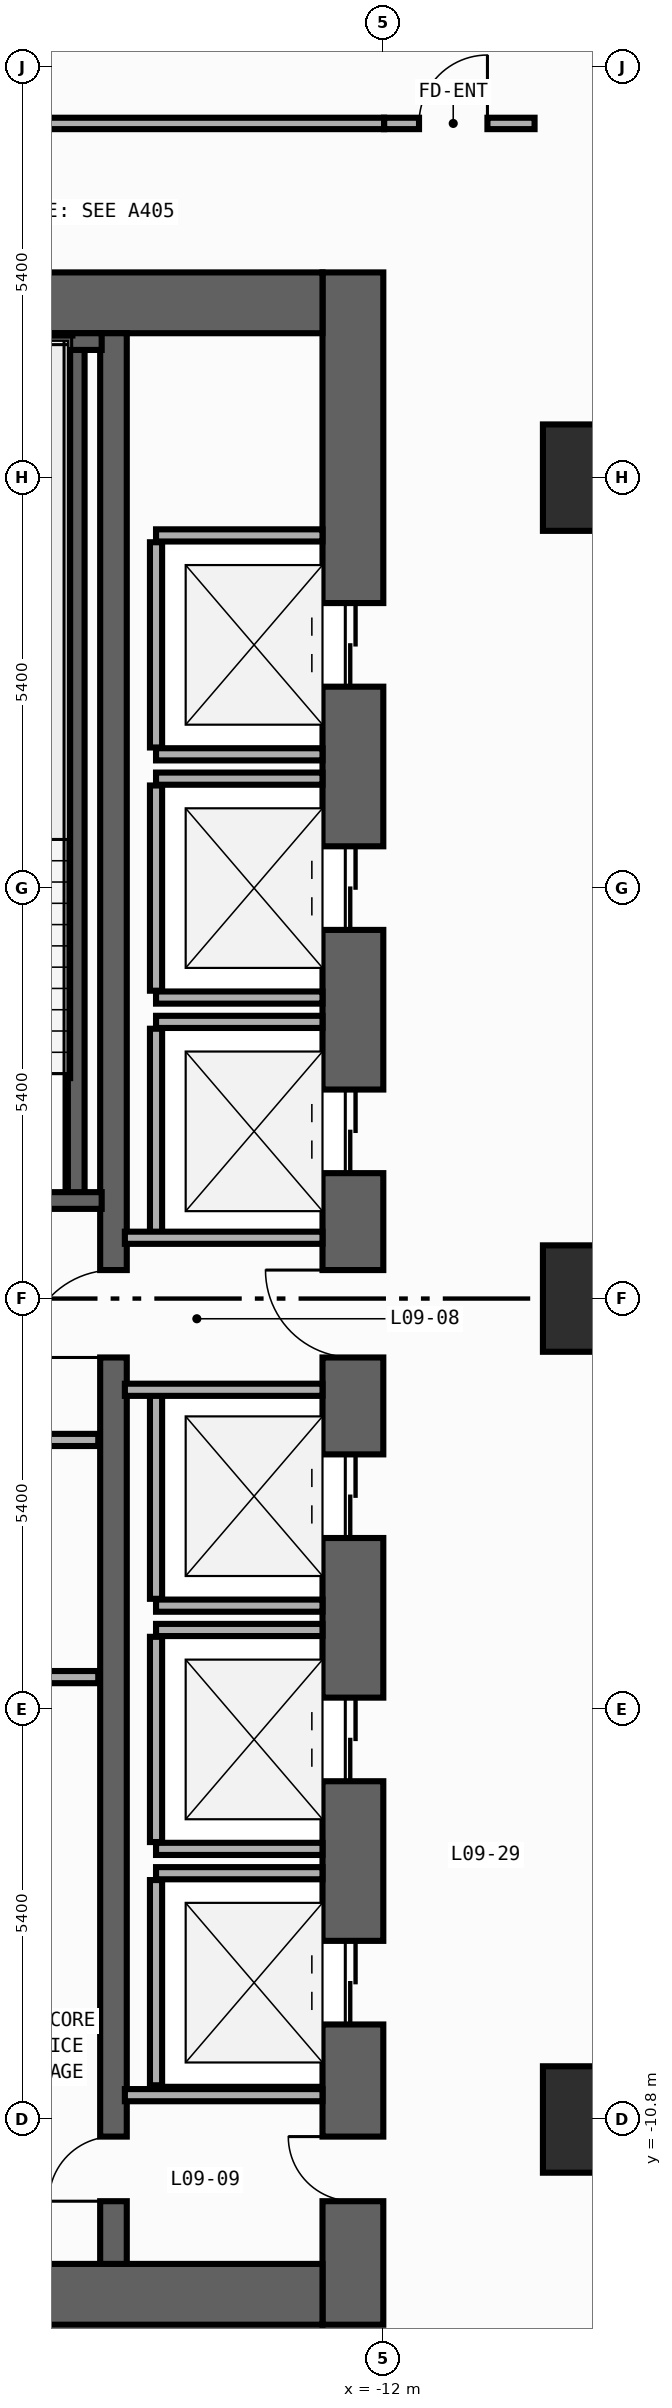
"""IFC4 building model, lengths in metres.
Left out: names, types, materials, properties, quantities, classifications, styles, units other than length and angle.
Written with IfcOpenShell. Run it as: python <this file> out.ifc"""

import sys

from ifc_helpers import new_model, si_unit, direction, frame, frame_2d, origin, origin_2d, place, context, subcontext, project, spatial, rectangle, extrude, element, fill, save


model = new_model("IFC4")
c1 = context("Model", 3, precision=1e-05, world=origin(), true_north=direction((0.0, 1.0)))
c2 = subcontext(c1, "Body", "Model", "MODEL_VIEW")
j1 = project(units=[si_unit("LENGTHUNIT", "METRE"), si_unit("PLANEANGLEUNIT", "RADIAN")], contexts=[c1])
p1 = place(None, origin())
s1 = spatial("IfcSite", under=j1, at=p1, CompositionType="ELEMENT")
p2 = place(p1, origin())
s2 = spatial("IfcBuilding", under=s1, at=p2, CompositionType="ELEMENT")
p3 = place(p2, frame((0.0, 0.0, 38.6)))
s3 = spatial("IfcBuildingStorey", under=s2, at=p3, CompositionType="ELEMENT", Elevation=38.6)
p4 = place(p3, frame((-12.4, -13.5, 0.0), z_axis=(0.0, 0.0, 1.0), x_axis=(0.0, 1.0, 0.0)))
e1 = element("IfcWall", 1, at=p4, inside=s3, PredefinedType="SHEAR", context=c2, shape_type="SweptSolid", body=[
    extrude(rectangle(XDim=27.0, YDim=0.8, at=frame_2d((13.5, 0.0))), origin(), (0.0, 0.0, 1.0), 3.94),
])
p5 = place(p4, frame((21.55, 0.0, 0.0)))
e2 = element("IfcOpeningElement", 2, at=p5, cuts=e1, PredefinedType="OPENING", context=c2, shape_type="SweptSolid", body=[
    extrude(rectangle(XDim=1.1, YDim=2.2, at=frame_2d((0.55, 1.1))), frame((0.0, 0.41, 0.0), z_axis=(0.0, -1.0, 0.0), x_axis=(1.0, 0.0, 0.0)), (0.0, 0.0, 1.0), 0.82),
])
p6 = place(p4, frame((18.35, 0.0, 0.0)))
e3 = element("IfcOpeningElement", 3, at=p6, cuts=e1, PredefinedType="OPENING", context=c2, shape_type="SweptSolid", body=[
    extrude(rectangle(XDim=1.1, YDim=2.2, at=frame_2d((0.55, 1.1))), frame((0.0, 0.41, 0.0), z_axis=(0.0, -1.0, 0.0), x_axis=(1.0, 0.0, 0.0)), (0.0, 0.0, 1.0), 0.82),
])
p7 = place(p4, frame((15.15, 0.0, 0.0)))
e4 = element("IfcOpeningElement", 4, at=p7, cuts=e1, PredefinedType="OPENING", context=c2, shape_type="SweptSolid", body=[
    extrude(rectangle(XDim=1.1, YDim=2.2, at=frame_2d((0.55, 1.1))), frame((0.0, 0.41, 0.0), z_axis=(0.0, -1.0, 0.0), x_axis=(1.0, 0.0, 0.0)), (0.0, 0.0, 1.0), 0.82),
])
p8 = place(p4, frame((10.35, 0.0, 0.0)))
e5 = element("IfcOpeningElement", 5, at=p8, cuts=e1, PredefinedType="OPENING", context=c2, shape_type="SweptSolid", body=[
    extrude(rectangle(XDim=1.1, YDim=2.2, at=frame_2d((0.55, 1.1))), frame((0.0, 0.41, 0.0), z_axis=(0.0, -1.0, 0.0), x_axis=(1.0, 0.0, 0.0)), (0.0, 0.0, 1.0), 0.82),
])
p9 = place(p4, frame((7.15, 0.0, 0.0)))
e6 = element("IfcOpeningElement", 6, at=p9, cuts=e1, PredefinedType="OPENING", context=c2, shape_type="SweptSolid", body=[
    extrude(rectangle(XDim=1.1, YDim=2.2, at=frame_2d((0.55, 1.1))), frame((0.0, 0.41, 0.0), z_axis=(0.0, -1.0, 0.0), x_axis=(1.0, 0.0, 0.0)), (0.0, 0.0, 1.0), 0.82),
])
p10 = place(p4, frame((3.95, 0.0, 0.0)))
e7 = element("IfcOpeningElement", 7, at=p10, cuts=e1, PredefinedType="OPENING", context=c2, shape_type="SweptSolid", body=[
    extrude(rectangle(XDim=1.1, YDim=2.2, at=frame_2d((0.55, 1.1))), frame((0.0, 0.41, 0.0), z_axis=(0.0, -1.0, 0.0), x_axis=(1.0, 0.0, 0.0)), (0.0, 0.0, 1.0), 0.82),
])
p11 = place(p4, frame((12.725, 0.0, 0.0)))
e8 = element("IfcOpeningElement", 8, at=p11, cuts=e1, PredefinedType="OPENING", context=c2, shape_type="SweptSolid", body=[
    extrude(rectangle(XDim=1.15, YDim=2.2, at=frame_2d((0.575, 1.1))), frame((0.0, 0.41, 0.0), z_axis=(0.0, -1.0, 0.0), x_axis=(1.0, 0.0, 0.0)), (0.0, 0.0, 1.0), 0.82),
])
p12 = place(p4, frame((1.625, 0.0, 0.0)))
e9 = element("IfcOpeningElement", 9, at=p12, cuts=e1, PredefinedType="OPENING", context=c2, shape_type="SweptSolid", body=[
    extrude(rectangle(XDim=0.85, YDim=2.1, at=frame_2d((0.425, 1.05))), frame((0.0, 0.41, 0.0), z_axis=(0.0, -1.0, 0.0), x_axis=(1.0, 0.0, 0.0)), (0.0, 0.0, 1.0), 0.82),
])
for number, where, z_axis, x_axis in (
    (10, (-19.6, -13.1, 0.0), (0.0, 0.0, 1.0), (1.0, 0.0, 0.0)),
    (11, (-19.6, 13.1, 0.0), (0.0, 0.0, 1.0), (1.0, 0.0, 0.0)),
):
    element("IfcWall", number, at=place(p3, frame(where, z_axis=z_axis, x_axis=x_axis)), inside=s3, PredefinedType="SHEAR", context=c2, shape_type="SweptSolid", body=[
        extrude(rectangle(XDim=6.8, YDim=0.8, at=frame_2d((3.4, 0.0))), origin(), (0.0, 0.0, 1.0), 3.94),
    ])
p13 = place(p3, frame((-15.55, -12.7, 0.0), z_axis=(0.0, 0.0, 1.0), x_axis=(0.0, 1.0, 0.0)))
e12 = element("IfcWall", 12, at=p13, inside=s3, PredefinedType="SHEAR", context=c2, shape_type="SweptSolid", body=[
    extrude(rectangle(XDim=25.4, YDim=0.35, at=frame_2d((12.7, 0.0))), origin(), (0.0, 0.0, 1.0), 3.94),
])
p14 = place(p13, frame((11.925, 0.0, 0.0)))
e13 = element("IfcOpeningElement", 13, at=p14, cuts=e12, PredefinedType="OPENING", context=c2, shape_type="SweptSolid", body=[
    extrude(rectangle(XDim=1.15, YDim=2.2, at=frame_2d((0.575, 1.1))), frame((0.0, 0.185, 0.0), z_axis=(0.0, -1.0, 0.0), x_axis=(1.0, 0.0, 0.0)), (0.0, 0.0, 1.0), 0.37),
])
p15 = place(p13, frame((0.825, 0.0, 0.0)))
e14 = element("IfcOpeningElement", 14, at=p15, cuts=e12, PredefinedType="OPENING", context=c2, shape_type="SweptSolid", body=[
    extrude(rectangle(XDim=0.85, YDim=2.1, at=frame_2d((0.425, 1.05))), frame((0.0, 0.185, 0.0), z_axis=(0.0, -1.0, 0.0), x_axis=(1.0, 0.0, 0.0)), (0.0, 0.0, 1.0), 0.37),
])
p16 = place(p3, frame((-16.04, 1.29, 0.0), z_axis=(0.0, 0.0, 1.0), x_axis=(0.0, 1.0, 0.0)))
e15 = element("IfcWall", 15, at=p16, inside=s3, PredefinedType="SHEAR", context=c2, shape_type="SweptSolid", body=[
    extrude(rectangle(XDim=11.3, YDim=0.22, at=frame_2d((5.65, 0.0))), origin(), (0.0, 0.0, 1.0), 3.94),
])
p17 = place(p3, frame((-19.62, 12.59, 0.0), z_axis=(0.0, 0.0, 1.0), x_axis=(1.0, 0.0, 0.0)))
e16 = element("IfcWall", 16, at=p17, inside=s3, PredefinedType="SHEAR", context=c2, shape_type="SweptSolid", body=[
    extrude(rectangle(XDim=3.915, YDim=0.22, at=frame_2d((1.958, 0.0))), origin(), (0.0, 0.0, 1.0), 3.94),
])
p18 = place(p3, frame((-19.62, 1.29, 0.0), z_axis=(0.0, 0.0, 1.0), x_axis=(1.0, 0.0, 0.0)))
e17 = element("IfcWall", 17, at=p18, inside=s3, PredefinedType="SHEAR", context=c2, shape_type="SweptSolid", body=[
    extrude(rectangle(XDim=3.915, YDim=0.22, at=frame_2d((1.958, 0.0))), origin(), (0.0, 0.0, 1.0), 3.94),
])
p19 = place(p18, frame((1.08, 0.0, 0.0)))
e18 = element("IfcOpeningElement", 18, at=p19, cuts=e17, PredefinedType="OPENING", context=c2, shape_type="SweptSolid", body=[
    extrude(rectangle(XDim=1.1, YDim=2.2, at=frame_2d((0.55, 1.1))), frame((0.0, 0.12, 0.0), z_axis=(0.0, -1.0, 0.0), x_axis=(1.0, 0.0, 0.0)), (0.0, 0.0, 1.0), 0.24),
])
for number, where, z_axis, x_axis in (
    (19, (-9.2, -10.8, 0.0), (0.0, 0.0, 1.0), (1.0, 0.0, 0.0)),
    (20, (-9.2, 0.0, 0.0), (0.0, 0.0, 1.0), (1.0, 0.0, 0.0)),
    (21, (-9.2, 10.8, 0.0), (0.0, 0.0, 1.0), (1.0, 0.0, 0.0)),
):
    element("IfcColumn", number, at=place(p3, frame(where, z_axis=z_axis, x_axis=x_axis)), inside=s3, PredefinedType="COLUMN", context=c2, shape_type="SweptSolid", body=[
        extrude(rectangle(XDim=1.4, YDim=1.4, at=origin_2d()), origin(), (0.0, 0.0, 1.0), 4.2),
    ])
for number, where, z_axis, x_axis in (
    (22, (-14.99, 7.16, 0.0), (0.0, 0.0, 1.0), (1.0, 0.0, 0.0)),
    (23, (-14.99, 10.04, 0.0), (0.0, 0.0, 1.0), (1.0, 0.0, 0.0)),
):
    element("IfcWall", number, at=place(p3, frame(where, z_axis=z_axis, x_axis=x_axis)), inside=s3, PredefinedType="STANDARD", context=c2, shape_type="SweptSolid", body=[
        extrude(rectangle(XDim=2.19, YDim=0.16, at=frame_2d((1.095, 0.0))), origin(), (0.0, 0.0, 1.0), 3.94),
    ])
p20 = place(p3, frame((-14.99, 7.25, 0.0), z_axis=(0.0, 0.0, 1.0), x_axis=(0.0, 1.0, 0.0)))
e24 = element("IfcWall", 24, at=p20, inside=s3, PredefinedType="STANDARD", context=c2, shape_type="SweptSolid", body=[
    extrude(rectangle(XDim=2.7, YDim=0.16, at=frame_2d((1.35, 0.0))), origin(), (0.0, 0.0, 1.0), 3.94),
])
for number, where, z_axis, x_axis in (
    (25, (-14.99, 3.96, 0.0), (0.0, 0.0, 1.0), (1.0, 0.0, 0.0)),
    (26, (-14.99, 6.84, 0.0), (0.0, 0.0, 1.0), (1.0, 0.0, 0.0)),
):
    element("IfcWall", number, at=place(p3, frame(where, z_axis=z_axis, x_axis=x_axis)), inside=s3, PredefinedType="STANDARD", context=c2, shape_type="SweptSolid", body=[
        extrude(rectangle(XDim=2.19, YDim=0.16, at=frame_2d((1.095, 0.0))), origin(), (0.0, 0.0, 1.0), 3.94),
    ])
p21 = place(p3, frame((-14.99, 4.05, 0.0), z_axis=(0.0, 0.0, 1.0), x_axis=(0.0, 1.0, 0.0)))
e27 = element("IfcWall", 27, at=p21, inside=s3, PredefinedType="STANDARD", context=c2, shape_type="SweptSolid", body=[
    extrude(rectangle(XDim=2.7, YDim=0.16, at=frame_2d((1.35, 0.0))), origin(), (0.0, 0.0, 1.0), 3.94),
])
p22 = place(p3, frame((-14.99, 3.64, 0.0), z_axis=(0.0, 0.0, 1.0), x_axis=(1.0, 0.0, 0.0)))
e28 = element("IfcWall", 28, at=p22, inside=s3, PredefinedType="STANDARD", context=c2, shape_type="SweptSolid", body=[
    extrude(rectangle(XDim=2.19, YDim=0.16, at=frame_2d((1.095, 0.0))), origin(), (0.0, 0.0, 1.0), 3.94),
])
p23 = place(p3, frame((-14.99, 0.85, 0.0), z_axis=(0.0, 0.0, 1.0), x_axis=(0.0, 1.0, 0.0)))
e29 = element("IfcWall", 29, at=p23, inside=s3, PredefinedType="STANDARD", context=c2, shape_type="SweptSolid", body=[
    extrude(rectangle(XDim=2.7, YDim=0.16, at=frame_2d((1.35, 0.0))), origin(), (0.0, 0.0, 1.0), 3.94),
])
p24 = place(p3, frame((-14.99, -4.04, 0.0), z_axis=(0.0, 0.0, 1.0), x_axis=(1.0, 0.0, 0.0)))
e30 = element("IfcWall", 30, at=p24, inside=s3, PredefinedType="STANDARD", context=c2, shape_type="SweptSolid", body=[
    extrude(rectangle(XDim=2.19, YDim=0.16, at=frame_2d((1.095, 0.0))), origin(), (0.0, 0.0, 1.0), 3.94),
])
p25 = place(p3, frame((-14.99, -3.95, 0.0), z_axis=(0.0, 0.0, 1.0), x_axis=(0.0, 1.0, 0.0)))
e31 = element("IfcWall", 31, at=p25, inside=s3, PredefinedType="STANDARD", context=c2, shape_type="SweptSolid", body=[
    extrude(rectangle(XDim=2.7, YDim=0.16, at=frame_2d((1.35, 0.0))), origin(), (0.0, 0.0, 1.0), 3.94),
])
for number, where, z_axis, x_axis in (
    (32, (-14.99, -7.24, 0.0), (0.0, 0.0, 1.0), (1.0, 0.0, 0.0)),
    (33, (-14.99, -4.36, 0.0), (0.0, 0.0, 1.0), (1.0, 0.0, 0.0)),
):
    element("IfcWall", number, at=place(p3, frame(where, z_axis=z_axis, x_axis=x_axis)), inside=s3, PredefinedType="STANDARD", context=c2, shape_type="SweptSolid", body=[
        extrude(rectangle(XDim=2.19, YDim=0.16, at=frame_2d((1.095, 0.0))), origin(), (0.0, 0.0, 1.0), 3.94),
    ])
p26 = place(p3, frame((-14.99, -7.15, 0.0), z_axis=(0.0, 0.0, 1.0), x_axis=(0.0, 1.0, 0.0)))
e34 = element("IfcWall", 34, at=p26, inside=s3, PredefinedType="STANDARD", context=c2, shape_type="SweptSolid", body=[
    extrude(rectangle(XDim=2.7, YDim=0.16, at=frame_2d((1.35, 0.0))), origin(), (0.0, 0.0, 1.0), 3.94),
])
p27 = place(p3, frame((-14.99, -7.56, 0.0), z_axis=(0.0, 0.0, 1.0), x_axis=(1.0, 0.0, 0.0)))
e35 = element("IfcWall", 35, at=p27, inside=s3, PredefinedType="STANDARD", context=c2, shape_type="SweptSolid", body=[
    extrude(rectangle(XDim=2.19, YDim=0.16, at=frame_2d((1.095, 0.0))), origin(), (0.0, 0.0, 1.0), 3.94),
])
p28 = place(p3, frame((-14.99, -10.35, 0.0), z_axis=(0.0, 0.0, 1.0), x_axis=(0.0, 1.0, 0.0)))
e36 = element("IfcWall", 36, at=p28, inside=s3, PredefinedType="STANDARD", context=c2, shape_type="SweptSolid", body=[
    extrude(rectangle(XDim=2.7, YDim=0.16, at=frame_2d((1.35, 0.0))), origin(), (0.0, 0.0, 1.0), 3.94),
])
p29 = place(p3, frame((-19.55, -1.86, 0.0), z_axis=(0.0, 0.0, 1.0), x_axis=(1.0, 0.0, 0.0)))
e37 = element("IfcWall", 37, at=p29, inside=s3, PredefinedType="STANDARD", context=c2, shape_type="SweptSolid", body=[
    extrude(rectangle(XDim=3.8, YDim=0.16, at=frame_2d((1.9, 0.0))), origin(), (0.0, 0.0, 1.0), 3.94),
])
p30 = place(p29, frame((1.18, 0.0, 0.0)))
e38 = element("IfcOpeningElement", 38, at=p30, cuts=e37, PredefinedType="OPENING", context=c2, shape_type="SweptSolid", body=[
    extrude(rectangle(XDim=1.15, YDim=2.2, at=frame_2d((0.575, 1.1))), frame((0.0, 0.09, 0.0), z_axis=(0.0, -1.0, 0.0), x_axis=(1.0, 0.0, 0.0)), (0.0, 0.0, 1.0), 0.18),
])
p31 = place(p3, frame((-19.55, -4.98, 0.0), z_axis=(0.0, 0.0, 1.0), x_axis=(1.0, 0.0, 0.0)))
e39 = element("IfcWall", 39, at=p31, inside=s3, PredefinedType="STANDARD", context=c2, shape_type="SweptSolid", body=[
    extrude(rectangle(XDim=3.8, YDim=0.16, at=frame_2d((1.9, 0.0))), origin(), (0.0, 0.0, 1.0), 3.94),
])
for number, where, z_axis, x_axis in (
    (40, (-15.4, 0.8, 0.0), (0.0, 0.0, 1.0), (1.0, 0.0, 0.0)),
    (41, (-15.4, -1.2, 0.0), (0.0, 0.0, 1.0), (1.0, 0.0, 0.0)),
    (42, (-15.4, -10.48, 0.0), (0.0, 0.0, 1.0), (1.0, 0.0, 0.0)),
):
    element("IfcWall", number, at=place(p3, frame(where, z_axis=z_axis, x_axis=x_axis)), inside=s3, PredefinedType="STANDARD", context=c2, shape_type="SweptSolid", body=[
        extrude(rectangle(XDim=2.6, YDim=0.16, at=frame_2d((1.3, 0.0))), origin(), (0.0, 0.0, 1.0), 3.94),
    ])
p32 = place(p3, frame((-11.99, 15.46, 0.0), z_axis=(0.0, 0.0, 1.0), x_axis=(1.0, 0.0, 0.0)))
e43 = element("IfcWall", 43, at=p32, inside=s3, PredefinedType="PARTITIONING", context=c2, shape_type="SweptSolid", body=[
    extrude(rectangle(XDim=1.98, YDim=0.15, at=frame_2d((0.99, 0.0))), origin(), (0.0, 0.0, 1.0), 3.94),
])
p33 = place(p32, frame((0.46, 0.0, 0.0)))
e44 = element("IfcOpeningElement", 44, at=p33, cuts=e43, PredefinedType="OPENING", context=c2, shape_type="SweptSolid", body=[
    extrude(rectangle(XDim=0.9, YDim=2.15, at=frame_2d((0.45, 1.075))), frame((0.0, 0.085, 0.0), z_axis=(0.0, -1.0, 0.0), x_axis=(1.0, 0.0, 0.0)), (0.0, 0.0, 1.0), 0.17),
])
p34 = place(p3, frame((-20.64, 15.46, 0.0), z_axis=(0.0, 0.0, 1.0), x_axis=(1.0, 0.0, 0.0)))
e45 = element("IfcWall", 45, at=p34, inside=s3, PredefinedType="PARTITIONING", context=c2, shape_type="SweptSolid", body=[
    extrude(rectangle(XDim=8.65, YDim=0.15, at=frame_2d((4.325, 0.0))), origin(), (0.0, 0.0, 1.0), 3.94),
])
p35 = place(p34, frame((2.871, 0.0, 0.0)))
e46 = element("IfcOpeningElement", 46, at=p35, cuts=e45, PredefinedType="OPENING", context=c2, shape_type="SweptSolid", body=[
    extrude(rectangle(XDim=0.9, YDim=2.15, at=frame_2d((0.45, 1.075))), frame((0.0, 0.085, 0.0), z_axis=(0.0, -1.0, 0.0), x_axis=(1.0, 0.0, 0.0)), (0.0, 0.0, 1.0), 0.17),
])
p36 = place(p5, origin())
e47 = element("IfcDoor", 47, at=p36, inside=s3, OperationType="DOUBLE_DOOR_SLIDING", PredefinedType="DOOR", context=c2, shape_type="SweptSolid", body=[
    extrude(rectangle(XDim=1.1, YDim=2.2, at=frame_2d((0.55, 1.1))), frame((0.0, 0.025, 0.0), z_axis=(0.0, -1.0, 0.0), x_axis=(1.0, 0.0, 0.0)), (0.0, 0.0, 1.0), 0.05),
])
fill(e2, e47)
p37 = place(p6, origin())
e48 = element("IfcDoor", 48, at=p37, inside=s3, OperationType="DOUBLE_DOOR_SLIDING", PredefinedType="DOOR", context=c2, shape_type="SweptSolid", body=[
    extrude(rectangle(XDim=1.1, YDim=2.2, at=frame_2d((0.55, 1.1))), frame((0.0, 0.025, 0.0), z_axis=(0.0, -1.0, 0.0), x_axis=(1.0, 0.0, 0.0)), (0.0, 0.0, 1.0), 0.05),
])
fill(e3, e48)
p38 = place(p7, origin())
e49 = element("IfcDoor", 49, at=p38, inside=s3, OperationType="DOUBLE_DOOR_SLIDING", PredefinedType="DOOR", context=c2, shape_type="SweptSolid", body=[
    extrude(rectangle(XDim=1.1, YDim=2.2, at=frame_2d((0.55, 1.1))), frame((0.0, 0.025, 0.0), z_axis=(0.0, -1.0, 0.0), x_axis=(1.0, 0.0, 0.0)), (0.0, 0.0, 1.0), 0.05),
])
fill(e4, e49)
p39 = place(p8, origin())
e50 = element("IfcDoor", 50, at=p39, inside=s3, OperationType="DOUBLE_DOOR_SLIDING", PredefinedType="DOOR", context=c2, shape_type="SweptSolid", body=[
    extrude(rectangle(XDim=1.1, YDim=2.2, at=frame_2d((0.55, 1.1))), frame((0.0, 0.025, 0.0), z_axis=(0.0, -1.0, 0.0), x_axis=(1.0, 0.0, 0.0)), (0.0, 0.0, 1.0), 0.05),
])
fill(e5, e50)
p40 = place(p9, origin())
e51 = element("IfcDoor", 51, at=p40, inside=s3, OperationType="DOUBLE_DOOR_SLIDING", PredefinedType="DOOR", context=c2, shape_type="SweptSolid", body=[
    extrude(rectangle(XDim=1.1, YDim=2.2, at=frame_2d((0.55, 1.1))), frame((0.0, 0.025, 0.0), z_axis=(0.0, -1.0, 0.0), x_axis=(1.0, 0.0, 0.0)), (0.0, 0.0, 1.0), 0.05),
])
fill(e6, e51)
p41 = place(p10, origin())
e52 = element("IfcDoor", 52, at=p41, inside=s3, OperationType="DOUBLE_DOOR_SLIDING", PredefinedType="DOOR", context=c2, shape_type="SweptSolid", body=[
    extrude(rectangle(XDim=1.1, YDim=2.2, at=frame_2d((0.55, 1.1))), frame((0.0, 0.025, 0.0), z_axis=(0.0, -1.0, 0.0), x_axis=(1.0, 0.0, 0.0)), (0.0, 0.0, 1.0), 0.05),
])
fill(e7, e52)
p42 = place(p11, origin())
e53 = element("IfcDoor", 53, at=p42, inside=s3, OperationType="SINGLE_SWING_RIGHT", PredefinedType="DOOR", context=c2, shape_type="SweptSolid", body=[
    extrude(rectangle(XDim=1.15, YDim=2.2, at=frame_2d((0.575, 1.1))), frame((0.0, 0.025, 0.0), z_axis=(0.0, -1.0, 0.0), x_axis=(1.0, 0.0, 0.0)), (0.0, 0.0, 1.0), 0.05),
])
fill(e8, e53)
p43 = place(p14, origin())
e54 = element("IfcDoor", 54, at=p43, inside=s3, OperationType="SINGLE_SWING_LEFT", PredefinedType="DOOR", context=c2, shape_type="SweptSolid", body=[
    extrude(rectangle(XDim=1.15, YDim=2.2, at=frame_2d((0.575, 1.1))), frame((0.0, 0.025, 0.0), z_axis=(0.0, -1.0, 0.0), x_axis=(1.0, 0.0, 0.0)), (0.0, 0.0, 1.0), 0.05),
])
fill(e13, e54)
p44 = place(p12, origin())
e55 = element("IfcDoor", 55, at=p44, inside=s3, OperationType="SINGLE_SWING_RIGHT", PredefinedType="DOOR", context=c2, shape_type="SweptSolid", body=[
    extrude(rectangle(XDim=0.85, YDim=2.1, at=frame_2d((0.425, 1.05))), frame((0.0, 0.025, 0.0), z_axis=(0.0, -1.0, 0.0), x_axis=(1.0, 0.0, 0.0)), (0.0, 0.0, 1.0), 0.05),
])
fill(e9, e55)
p45 = place(p15, origin())
e56 = element("IfcDoor", 56, at=p45, inside=s3, OperationType="SINGLE_SWING_LEFT", PredefinedType="DOOR", context=c2, shape_type="SweptSolid", body=[
    extrude(rectangle(XDim=0.85, YDim=2.1, at=frame_2d((0.425, 1.05))), frame((0.0, 0.025, 0.0), z_axis=(0.0, -1.0, 0.0), x_axis=(1.0, 0.0, 0.0)), (0.0, 0.0, 1.0), 0.05),
])
fill(e14, e56)
p46 = place(p33, origin())
e57 = element("IfcDoor", 57, at=p46, inside=s3, OperationType="SINGLE_SWING_RIGHT", PredefinedType="DOOR", context=c2, shape_type="SweptSolid", body=[
    extrude(rectangle(XDim=0.9, YDim=2.15, at=frame_2d((0.45, 1.075))), frame((0.0, 0.025, 0.0), z_axis=(0.0, -1.0, 0.0), x_axis=(1.0, 0.0, 0.0)), (0.0, 0.0, 1.0), 0.05),
])
fill(e44, e57)
save(model, sys.argv[1])
